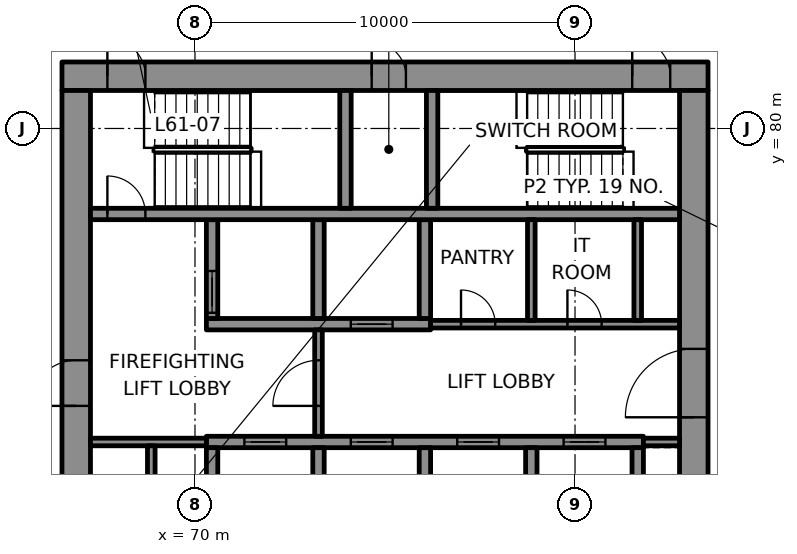
"""IFC4 building model, lengths in metres.
Left out: names, types, materials, properties, quantities, classifications, styles, units other than length and angle.
Written with IfcOpenShell. Run it as: python <this file> out.ifc"""

import sys

from ifc_helpers import new_model, si_unit, direction, frame, frame_2d, origin, place, context, subcontext, project, spatial, rectangle, extrude, element, fill, save


model = new_model("IFC4")
c1 = context("Model", 3, precision=1e-05, world=origin(), true_north=direction((0.0, 1.0)))
c2 = subcontext(c1, "Body", "Model", "MODEL_VIEW")
j1 = project(units=[si_unit("LENGTHUNIT", "METRE"), si_unit("PLANEANGLEUNIT", "RADIAN")], contexts=[c1])
p1 = place(None, origin())
s1 = spatial("IfcSite", under=j1, at=p1, CompositionType="ELEMENT")
p2 = place(p1, origin())
s2 = spatial("IfcBuilding", under=s1, at=p2, CompositionType="ELEMENT")
p3 = place(p2, frame((0.0, 0.0, 260.1)))
s3 = spatial("IfcBuildingStorey", under=s2, at=p3, CompositionType="ELEMENT", Elevation=260.1)
p4 = place(p3, frame((66.5, 81.375, 0.0), z_axis=(0.0, 0.0, 1.0), x_axis=(1.0, 0.0, 0.0)))
e1 = element("IfcWall", 1, at=p4, inside=s3, PredefinedType="SHEAR", context=c2, shape_type="SweptSolid", body=[
    extrude(rectangle(XDim=17.0, YDim=0.75, at=frame_2d((8.5, 0.0))), origin(), (0.0, 0.0, 1.0), 3.3),
])
p5 = place(p4, frame((1.195, 0.0, 0.0)))
e2 = element("IfcOpeningElement", 2, at=p5, cuts=e1, PredefinedType="OPENING", context=c2, shape_type="SweptSolid", body=[
    extrude(rectangle(XDim=1.0, YDim=2.1, at=frame_2d((0.5, 1.05))), frame((0.0, 0.385, 0.0), z_axis=(0.0, -1.0, 0.0), x_axis=(1.0, 0.0, 0.0)), (0.0, 0.0, 1.0), 0.77),
])
p6 = place(p4, frame((15.005, 0.0, 0.0)))
e3 = element("IfcOpeningElement", 3, at=p6, cuts=e1, PredefinedType="OPENING", context=c2, shape_type="SweptSolid", body=[
    extrude(rectangle(XDim=1.0, YDim=2.1, at=frame_2d((0.5, 1.05))), frame((0.0, 0.385, 0.0), z_axis=(0.0, -1.0, 0.0), x_axis=(1.0, 0.0, 0.0)), (0.0, 0.0, 1.0), 0.77),
])
p7 = place(p4, frame((8.15, 0.0, 0.0)))
e4 = element("IfcOpeningElement", 4, at=p7, cuts=e1, PredefinedType="OPENING", context=c2, shape_type="SweptSolid", body=[
    extrude(rectangle(XDim=0.9, YDim=2.1, at=frame_2d((0.45, 1.05))), frame((0.0, 0.385, 0.0), z_axis=(0.0, -1.0, 0.0), x_axis=(1.0, 0.0, 0.0)), (0.0, 0.0, 1.0), 0.77),
])
p8 = place(p3, frame((66.875, 69.0, 0.0), z_axis=(0.0, 0.0, 1.0), x_axis=(0.0, 1.0, 0.0)))
e5 = element("IfcWall", 5, at=p8, inside=s3, PredefinedType="SHEAR", context=c2, shape_type="SweptSolid", body=[
    extrude(rectangle(XDim=12.0, YDim=0.75, at=frame_2d((6.0, 0.0))), origin(), (0.0, 0.0, 1.0), 3.3),
])
p9 = place(p8, frame((3.7, 0.0, 0.0)))
e6 = element("IfcOpeningElement", 6, at=p9, cuts=e5, PredefinedType="OPENING", context=c2, shape_type="SweptSolid", body=[
    extrude(rectangle(XDim=1.2, YDim=2.1, at=frame_2d((0.6, 1.05))), frame((0.0, 0.385, 0.0), z_axis=(0.0, -1.0, 0.0), x_axis=(1.0, 0.0, 0.0)), (0.0, 0.0, 1.0), 0.77),
])
p10 = place(p8, frame((0.925, 0.0, 0.0)))
e7 = element("IfcOpeningElement", 7, at=p10, cuts=e5, PredefinedType="OPENING", context=c2, shape_type="SweptSolid", body=[
    extrude(rectangle(XDim=0.9, YDim=2.1, at=frame_2d((0.45, 1.05))), frame((0.0, 0.385, 0.0), z_axis=(0.0, -1.0, 0.0), x_axis=(1.0, 0.0, 0.0)), (0.0, 0.0, 1.0), 0.77),
])
p11 = place(p3, frame((83.125, 69.0, 0.0), z_axis=(0.0, 0.0, 1.0), x_axis=(0.0, 1.0, 0.0)))
e8 = element("IfcWall", 8, at=p11, inside=s3, PredefinedType="SHEAR", context=c2, shape_type="SweptSolid", body=[
    extrude(rectangle(XDim=12.0, YDim=0.75, at=frame_2d((6.0, 0.0))), origin(), (0.0, 0.0, 1.0), 3.3),
])
p12 = place(p11, frame((3.4, 0.0, 0.0)))
e9 = element("IfcOpeningElement", 9, at=p12, cuts=e8, PredefinedType="OPENING", context=c2, shape_type="SweptSolid", body=[
    extrude(rectangle(XDim=1.8, YDim=2.1, at=frame_2d((0.9, 1.05))), frame((0.0, 0.385, 0.0), z_axis=(0.0, -1.0, 0.0), x_axis=(1.0, 0.0, 0.0)), (0.0, 0.0, 1.0), 0.77),
])
p13 = place(p3, frame((70.3, 71.75, 0.0), z_axis=(0.0, 0.0, 1.0), x_axis=(1.0, 0.0, 0.0)))
e10 = element("IfcWall", 10, at=p13, inside=s3, PredefinedType="SHEAR", context=c2, shape_type="SweptSolid", body=[
    extrude(rectangle(XDim=11.5, YDim=0.3, at=frame_2d((5.75, 0.0))), origin(), (0.0, 0.0, 1.0), 3.3),
])
p14 = place(p13, frame((1.0, 0.0, 0.0)))
e11 = element("IfcOpeningElement", 11, at=p14, cuts=e10, PredefinedType="OPENING", context=c2, shape_type="SweptSolid", body=[
    extrude(rectangle(XDim=1.1, YDim=2.1, at=frame_2d((0.55, 1.05))), frame((0.0, 0.16, 0.0), z_axis=(0.0, -1.0, 0.0), x_axis=(1.0, 0.0, 0.0)), (0.0, 0.0, 1.0), 0.32),
])
p15 = place(p13, frame((3.8, 0.0, 0.0)))
e12 = element("IfcOpeningElement", 12, at=p15, cuts=e10, PredefinedType="OPENING", context=c2, shape_type="SweptSolid", body=[
    extrude(rectangle(XDim=1.1, YDim=2.1, at=frame_2d((0.55, 1.05))), frame((0.0, 0.16, 0.0), z_axis=(0.0, -1.0, 0.0), x_axis=(1.0, 0.0, 0.0)), (0.0, 0.0, 1.0), 0.32),
])
p16 = place(p13, frame((6.6, 0.0, 0.0)))
e13 = element("IfcOpeningElement", 13, at=p16, cuts=e10, PredefinedType="OPENING", context=c2, shape_type="SweptSolid", body=[
    extrude(rectangle(XDim=1.1, YDim=2.1, at=frame_2d((0.55, 1.05))), frame((0.0, 0.16, 0.0), z_axis=(0.0, -1.0, 0.0), x_axis=(1.0, 0.0, 0.0)), (0.0, 0.0, 1.0), 0.32),
])
p17 = place(p13, frame((9.4, 0.0, 0.0)))
e14 = element("IfcOpeningElement", 14, at=p17, cuts=e10, PredefinedType="OPENING", context=c2, shape_type="SweptSolid", body=[
    extrude(rectangle(XDim=1.1, YDim=2.1, at=frame_2d((0.55, 1.05))), frame((0.0, 0.16, 0.0), z_axis=(0.0, -1.0, 0.0), x_axis=(1.0, 0.0, 0.0)), (0.0, 0.0, 1.0), 0.32),
])
p18 = place(p3, frame((70.3, 74.85, 0.0), z_axis=(0.0, 0.0, 1.0), x_axis=(1.0, 0.0, 0.0)))
e15 = element("IfcWall", 15, at=p18, inside=s3, PredefinedType="SHEAR", context=c2, shape_type="SweptSolid", body=[
    extrude(rectangle(XDim=5.9, YDim=0.3, at=frame_2d((2.95, 0.0))), origin(), (0.0, 0.0, 1.0), 3.3),
])
p19 = place(p18, frame((3.8, 0.0, 0.0)))
e16 = element("IfcOpeningElement", 16, at=p19, cuts=e15, PredefinedType="OPENING", context=c2, shape_type="SweptSolid", body=[
    extrude(rectangle(XDim=1.1, YDim=2.1, at=frame_2d((0.55, 1.05))), frame((0.0, 0.16, 0.0), z_axis=(0.0, -1.0, 0.0), x_axis=(1.0, 0.0, 0.0)), (0.0, 0.0, 1.0), 0.32),
])
p20 = place(p3, frame((70.45, 69.0, 0.0), z_axis=(0.0, 0.0, 1.0), x_axis=(0.0, 1.0, 0.0)))
e17 = element("IfcWall", 17, at=p20, inside=s3, PredefinedType="SHEAR", context=c2, shape_type="SweptSolid", body=[
    extrude(rectangle(XDim=2.6, YDim=0.3, at=frame_2d((1.3, 0.0))), origin(), (0.0, 0.0, 1.0), 3.3),
])
p21 = place(p3, frame((70.45, 75.0, 0.0), z_axis=(0.0, 0.0, 1.0), x_axis=(0.0, 1.0, 0.0)))
e18 = element("IfcWall", 18, at=p21, inside=s3, PredefinedType="SHEAR", context=c2, shape_type="SweptSolid", body=[
    extrude(rectangle(XDim=2.6, YDim=0.3, at=frame_2d((1.3, 0.0))), origin(), (0.0, 0.0, 1.0), 3.3),
])
p22 = place(p21, frame((0.15, 0.0, 0.0)))
e19 = element("IfcOpeningElement", 19, at=p22, cuts=e18, PredefinedType="OPENING", context=c2, shape_type="SweptSolid", body=[
    extrude(rectangle(XDim=1.1, YDim=2.1, at=frame_2d((0.55, 1.05))), frame((0.0, 0.16, 0.0), z_axis=(0.0, -1.0, 0.0), x_axis=(1.0, 0.0, 0.0)), (0.0, 0.0, 1.0), 0.32),
])
for number, where, z_axis, x_axis in (
    (20, (73.25, 69.0, 0.0), (0.0, 0.0, 1.0), (0.0, 1.0, 0.0)),
    (21, (73.25, 75.0, 0.0), (0.0, 0.0, 1.0), (0.0, 1.0, 0.0)),
    (22, (76.05, 69.0, 0.0), (0.0, 0.0, 1.0), (0.0, 1.0, 0.0)),
    (23, (76.05, 75.0, 0.0), (0.0, 0.0, 1.0), (0.0, 1.0, 0.0)),
    (24, (78.85, 69.0, 0.0), (0.0, 0.0, 1.0), (0.0, 1.0, 0.0)),
    (25, (81.65, 69.0, 0.0), (0.0, 0.0, 1.0), (0.0, 1.0, 0.0)),
):
    element("IfcWall", number, at=place(p3, frame(where, z_axis=z_axis, x_axis=x_axis)), inside=s3, PredefinedType="SHEAR", context=c2, shape_type="SweptSolid", body=[
        extrude(rectangle(XDim=2.6, YDim=0.3, at=frame_2d((1.3, 0.0))), origin(), (0.0, 0.0, 1.0), 3.3),
    ])
p23 = place(p3, frame((67.25, 77.75, 0.0), z_axis=(0.0, 0.0, 1.0), x_axis=(1.0, 0.0, 0.0)))
e26 = element("IfcWall", 26, at=p23, inside=s3, PredefinedType="SHEAR", context=c2, shape_type="SweptSolid", body=[
    extrude(rectangle(XDim=15.5, YDim=0.3, at=frame_2d((7.75, 0.0))), origin(), (0.0, 0.0, 1.0), 3.3),
])
p24 = place(p23, frame((0.445, 0.0, 0.0)))
e27 = element("IfcOpeningElement", 27, at=p24, cuts=e26, PredefinedType="OPENING", context=c2, shape_type="SweptSolid", body=[
    extrude(rectangle(XDim=1.0, YDim=2.1, at=frame_2d((0.5, 1.05))), frame((0.0, 0.16, 0.0), z_axis=(0.0, -1.0, 0.0), x_axis=(1.0, 0.0, 0.0)), (0.0, 0.0, 1.0), 0.32),
])
for number, where, z_axis, x_axis in (
    (28, (73.96, 77.9, 0.0), (0.0, 0.0, 1.0), (0.0, 1.0, 0.0)),
    (29, (76.24, 77.9, 0.0), (0.0, 0.0, 1.0), (0.0, 1.0, 0.0)),
):
    element("IfcWall", number, at=place(p3, frame(where, z_axis=z_axis, x_axis=x_axis)), inside=s3, PredefinedType="SHEAR", context=c2, shape_type="SweptSolid", body=[
        extrude(rectangle(XDim=3.1, YDim=0.3, at=frame_2d((1.55, 0.0))), origin(), (0.0, 0.0, 1.0), 3.3),
    ])
p25 = place(p3, frame((67.25, 71.75, 0.0), z_axis=(0.0, 0.0, 1.0), x_axis=(1.0, 0.0, 0.0)))
e30 = element("IfcWall", 30, at=p25, inside=s3, PredefinedType="PARTITIONING", context=c2, shape_type="SweptSolid", body=[
    extrude(rectangle(XDim=3.05, YDim=0.2, at=frame_2d((1.525, 0.0))), origin(), (0.0, 0.0, 1.0), 3.3),
])
p26 = place(p3, frame((81.8, 71.75, 0.0), z_axis=(0.0, 0.0, 1.0), x_axis=(1.0, 0.0, 0.0)))
e31 = element("IfcWall", 31, at=p26, inside=s3, PredefinedType="PARTITIONING", context=c2, shape_type="SweptSolid", body=[
    extrude(rectangle(XDim=0.95, YDim=0.2, at=frame_2d((0.475, 0.0))), origin(), (0.0, 0.0, 1.0), 3.3),
])
p27 = place(p3, frame((76.2, 74.85, 0.0), z_axis=(0.0, 0.0, 1.0), x_axis=(1.0, 0.0, 0.0)))
e32 = element("IfcWall", 32, at=p27, inside=s3, PredefinedType="PARTITIONING", context=c2, shape_type="SweptSolid", body=[
    extrude(rectangle(XDim=6.55, YDim=0.2, at=frame_2d((3.275, 0.0))), origin(), (0.0, 0.0, 1.0), 3.3),
])
p28 = place(p27, frame((0.8, 0.0, 0.0)))
e33 = element("IfcOpeningElement", 33, at=p28, cuts=e32, PredefinedType="OPENING", context=c2, shape_type="SweptSolid", body=[
    extrude(rectangle(XDim=0.9, YDim=2.1, at=frame_2d((0.45, 1.05))), frame((0.0, 0.11, 0.0), z_axis=(0.0, -1.0, 0.0), x_axis=(1.0, 0.0, 0.0)), (0.0, 0.0, 1.0), 0.22),
])
p29 = place(p27, frame((3.6, 0.0, 0.0)))
e34 = element("IfcOpeningElement", 34, at=p29, cuts=e32, PredefinedType="OPENING", context=c2, shape_type="SweptSolid", body=[
    extrude(rectangle(XDim=0.9, YDim=2.1, at=frame_2d((0.45, 1.05))), frame((0.0, 0.11, 0.0), z_axis=(0.0, -1.0, 0.0), x_axis=(1.0, 0.0, 0.0)), (0.0, 0.0, 1.0), 0.22),
])
p30 = place(p3, frame((68.85, 69.0, 0.0), z_axis=(0.0, 0.0, 1.0), x_axis=(0.0, 1.0, 0.0)))
e35 = element("IfcWall", 35, at=p30, inside=s3, PredefinedType="PARTITIONING", context=c2, shape_type="SweptSolid", body=[
    extrude(rectangle(XDim=2.65, YDim=0.2, at=frame_2d((1.325, 0.0))), origin(), (0.0, 0.0, 1.0), 3.3),
])
p31 = place(p3, frame((73.25, 71.9, 0.0), z_axis=(0.0, 0.0, 1.0), x_axis=(0.0, 1.0, 0.0)))
e36 = element("IfcWall", 36, at=p31, inside=s3, PredefinedType="PARTITIONING", context=c2, shape_type="SweptSolid", body=[
    extrude(rectangle(XDim=2.8, YDim=0.2, at=frame_2d((1.4, 0.0))), origin(), (0.0, 0.0, 1.0), 3.3),
])
p32 = place(p31, frame((0.8, 0.0, 0.0)))
e37 = element("IfcOpeningElement", 37, at=p32, cuts=e36, PredefinedType="OPENING", context=c2, shape_type="SweptSolid", body=[
    extrude(rectangle(XDim=1.2, YDim=2.1, at=frame_2d((0.6, 1.05))), frame((0.0, 0.11, 0.0), z_axis=(0.0, -1.0, 0.0), x_axis=(1.0, 0.0, 0.0)), (0.0, 0.0, 1.0), 0.22),
])
for number, where, z_axis, x_axis in (
    (38, (78.85, 74.95, 0.0), (0.0, 0.0, 1.0), (0.0, 1.0, 0.0)),
    (39, (81.65, 74.95, 0.0), (0.0, 0.0, 1.0), (0.0, 1.0, 0.0)),
):
    element("IfcWall", number, at=place(p3, frame(where, z_axis=z_axis, x_axis=x_axis)), inside=s3, PredefinedType="PARTITIONING", context=c2, shape_type="SweptSolid", body=[
        extrude(rectangle(XDim=2.65, YDim=0.2, at=frame_2d((1.325, 0.0))), origin(), (0.0, 0.0, 1.0), 3.3),
    ])
p33 = place(p14, origin())
e40 = element("IfcDoor", 40, at=p33, inside=s3, OperationType="DOUBLE_DOOR_SLIDING", PredefinedType="DOOR", context=c2, shape_type="SweptSolid", body=[
    extrude(rectangle(XDim=1.1, YDim=2.1, at=frame_2d((0.55, 1.05))), frame((0.0, 0.025, 0.0), z_axis=(0.0, -1.0, 0.0), x_axis=(1.0, 0.0, 0.0)), (0.0, 0.0, 1.0), 0.05),
])
fill(e11, e40)
p34 = place(p15, origin())
e41 = element("IfcDoor", 41, at=p34, inside=s3, OperationType="DOUBLE_DOOR_SLIDING", PredefinedType="DOOR", context=c2, shape_type="SweptSolid", body=[
    extrude(rectangle(XDim=1.1, YDim=2.1, at=frame_2d((0.55, 1.05))), frame((0.0, 0.025, 0.0), z_axis=(0.0, -1.0, 0.0), x_axis=(1.0, 0.0, 0.0)), (0.0, 0.0, 1.0), 0.05),
])
fill(e12, e41)
p35 = place(p16, origin())
e42 = element("IfcDoor", 42, at=p35, inside=s3, OperationType="DOUBLE_DOOR_SLIDING", PredefinedType="DOOR", context=c2, shape_type="SweptSolid", body=[
    extrude(rectangle(XDim=1.1, YDim=2.1, at=frame_2d((0.55, 1.05))), frame((0.0, 0.025, 0.0), z_axis=(0.0, -1.0, 0.0), x_axis=(1.0, 0.0, 0.0)), (0.0, 0.0, 1.0), 0.05),
])
fill(e13, e42)
p36 = place(p17, origin())
e43 = element("IfcDoor", 43, at=p36, inside=s3, OperationType="DOUBLE_DOOR_SLIDING", PredefinedType="DOOR", context=c2, shape_type="SweptSolid", body=[
    extrude(rectangle(XDim=1.1, YDim=2.1, at=frame_2d((0.55, 1.05))), frame((0.0, 0.025, 0.0), z_axis=(0.0, -1.0, 0.0), x_axis=(1.0, 0.0, 0.0)), (0.0, 0.0, 1.0), 0.05),
])
fill(e14, e43)
p37 = place(p22, origin())
e44 = element("IfcDoor", 44, at=p37, inside=s3, OperationType="DOUBLE_DOOR_SLIDING", PredefinedType="DOOR", context=c2, shape_type="SweptSolid", body=[
    extrude(rectangle(XDim=1.1, YDim=2.1, at=frame_2d((0.55, 1.05))), frame((0.0, 0.025, 0.0), z_axis=(0.0, -1.0, 0.0), x_axis=(1.0, 0.0, 0.0)), (0.0, 0.0, 1.0), 0.05),
])
fill(e19, e44)
p38 = place(p19, origin())
e45 = element("IfcDoor", 45, at=p38, inside=s3, OperationType="DOUBLE_DOOR_SLIDING", PredefinedType="DOOR", context=c2, shape_type="SweptSolid", body=[
    extrude(rectangle(XDim=1.1, YDim=2.1, at=frame_2d((0.55, 1.05))), frame((0.0, 0.025, 0.0), z_axis=(0.0, -1.0, 0.0), x_axis=(1.0, 0.0, 0.0)), (0.0, 0.0, 1.0), 0.05),
])
fill(e16, e45)
p39 = place(p24, origin())
e46 = element("IfcDoor", 46, at=p39, inside=s3, OperationType="SINGLE_SWING_LEFT", PredefinedType="DOOR", context=c2, shape_type="SweptSolid", body=[
    extrude(rectangle(XDim=1.0, YDim=2.1, at=frame_2d((0.5, 1.05))), frame((0.0, 0.025, 0.0), z_axis=(0.0, -1.0, 0.0), x_axis=(1.0, 0.0, 0.0)), (0.0, 0.0, 1.0), 0.05),
])
fill(e27, e46)
p40 = place(p5, origin())
e47 = element("IfcDoor", 47, at=p40, inside=s3, OperationType="SINGLE_SWING_RIGHT", PredefinedType="DOOR", context=c2, shape_type="SweptSolid", body=[
    extrude(rectangle(XDim=1.0, YDim=2.1, at=frame_2d((0.5, 1.05))), frame((0.0, 0.095, 0.0), z_axis=(0.0, -1.0, 0.0), x_axis=(1.0, 0.0, 0.0)), (0.0, 0.0, 1.0), 0.19),
])
fill(e2, e47)
p41 = place(p6, origin())
e48 = element("IfcDoor", 48, at=p41, inside=s3, OperationType="SINGLE_SWING_LEFT", PredefinedType="DOOR", context=c2, shape_type="SweptSolid", body=[
    extrude(rectangle(XDim=1.0, YDim=2.1, at=frame_2d((0.5, 1.05))), frame((0.0, 0.095, 0.0), z_axis=(0.0, -1.0, 0.0), x_axis=(1.0, 0.0, 0.0)), (0.0, 0.0, 1.0), 0.19),
])
fill(e3, e48)
p42 = place(p32, origin())
e49 = element("IfcDoor", 49, at=p42, inside=s3, OperationType="SINGLE_SWING_LEFT", PredefinedType="DOOR", context=c2, shape_type="SweptSolid", body=[
    extrude(rectangle(XDim=1.2, YDim=2.1, at=frame_2d((0.6, 1.05))), frame((0.0, 0.025, 0.0), z_axis=(0.0, -1.0, 0.0), x_axis=(1.0, 0.0, 0.0)), (0.0, 0.0, 1.0), 0.05),
])
fill(e37, e49)
p43 = place(p9, origin())
e50 = element("IfcDoor", 50, at=p43, inside=s3, OperationType="SINGLE_SWING_RIGHT", PredefinedType="DOOR", context=c2, shape_type="SweptSolid", body=[
    extrude(rectangle(XDim=1.2, YDim=2.1, at=frame_2d((0.6, 1.05))), frame((0.0, 0.095, 0.0), z_axis=(0.0, -1.0, 0.0), x_axis=(1.0, 0.0, 0.0)), (0.0, 0.0, 1.0), 0.19),
])
fill(e6, e50)
p44 = place(p12, origin())
e51 = element("IfcDoor", 51, at=p44, inside=s3, OperationType="SINGLE_SWING_LEFT", PredefinedType="DOOR", context=c2, shape_type="SweptSolid", body=[
    extrude(rectangle(XDim=1.8, YDim=2.1, at=frame_2d((0.9, 1.05))), frame((0.0, 0.095, 0.0), z_axis=(0.0, -1.0, 0.0), x_axis=(1.0, 0.0, 0.0)), (0.0, 0.0, 1.0), 0.19),
])
fill(e9, e51)
p45 = place(p28, origin())
e52 = element("IfcDoor", 52, at=p45, inside=s3, OperationType="SINGLE_SWING_RIGHT", PredefinedType="DOOR", context=c2, shape_type="SweptSolid", body=[
    extrude(rectangle(XDim=0.9, YDim=2.1, at=frame_2d((0.45, 1.05))), frame((0.0, 0.025, 0.0), z_axis=(0.0, -1.0, 0.0), x_axis=(1.0, 0.0, 0.0)), (0.0, 0.0, 1.0), 0.05),
])
fill(e33, e52)
p46 = place(p29, origin())
e53 = element("IfcDoor", 53, at=p46, inside=s3, OperationType="SINGLE_SWING_LEFT", PredefinedType="DOOR", context=c2, shape_type="SweptSolid", body=[
    extrude(rectangle(XDim=0.9, YDim=2.1, at=frame_2d((0.45, 1.05))), frame((0.0, 0.025, 0.0), z_axis=(0.0, -1.0, 0.0), x_axis=(1.0, 0.0, 0.0)), (0.0, 0.0, 1.0), 0.05),
])
fill(e34, e53)
p47 = place(p7, origin())
e54 = element("IfcDoor", 54, at=p47, inside=s3, OperationType="SINGLE_SWING_RIGHT", PredefinedType="DOOR", context=c2, shape_type="SweptSolid", body=[
    extrude(rectangle(XDim=0.9, YDim=2.1, at=frame_2d((0.45, 1.05))), frame((0.0, 0.095, 0.0), z_axis=(0.0, -1.0, 0.0), x_axis=(1.0, 0.0, 0.0)), (0.0, 0.0, 1.0), 0.19),
])
fill(e4, e54)
save(model, sys.argv[1])
